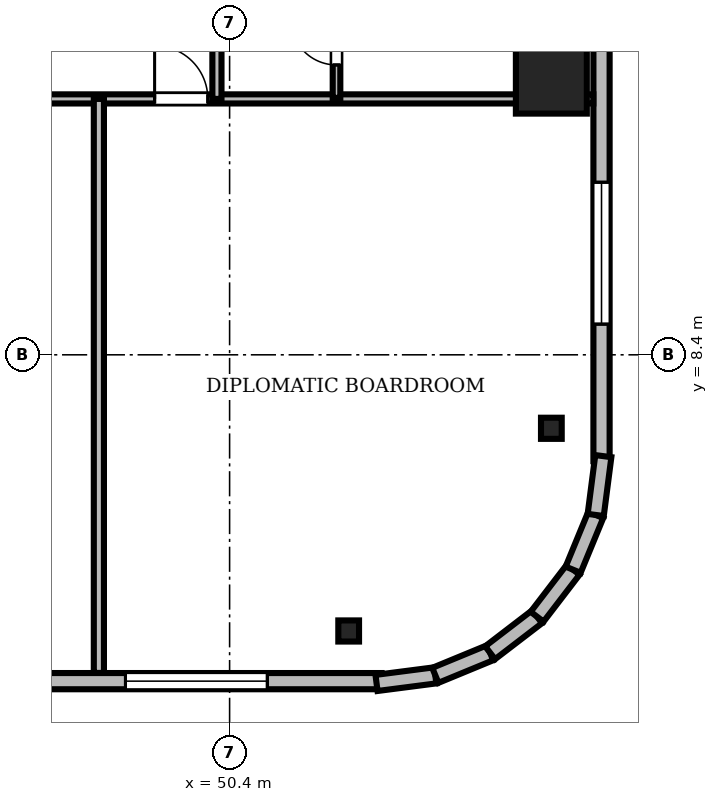
"""IFC4 building model, lengths in metres.
Left out: names, types, materials, properties, quantities, classifications, styles, units other than length and angle.
Written with IfcOpenShell. Run it as: python <this file> out.ifc"""

import sys

from ifc_helpers import new_model, si_unit, direction, frame, frame_2d, origin, origin_2d, place, context, subcontext, project, spatial, rectangle, i_section, extrude, source, transform, mapped, element, fill, save


model = new_model("IFC4")
c1 = context("Model", 3, precision=1e-05, world=origin(), true_north=direction((0.0, 1.0)))
c2 = subcontext(c1, "Body", "Model", "MODEL_VIEW")
j1 = project(units=[si_unit("LENGTHUNIT", "METRE"), si_unit("PLANEANGLEUNIT", "RADIAN")], contexts=[c1])
p1 = place(None, origin())
s1 = spatial("IfcSite", under=j1, at=p1, CompositionType="ELEMENT")
p2 = place(p1, origin())
s2 = spatial("IfcBuilding", under=s1, at=p2, CompositionType="ELEMENT")
p3 = place(p2, frame((0.0, 0.0, 203.55)))
s3 = spatial("IfcBuildingStorey", under=s2, at=p3, CompositionType="ELEMENT", Elevation=203.55)
m1 = source(origin(), c2, "Body", "SweptSolid", [
    extrude(rectangle(XDim=1.4, YDim=1.4, at=origin_2d()), origin(), (0.0, 0.0, 1.0), 3.53),
])
p4 = place(p3, frame((56.75, 13.86, 0.0), z_axis=(0.0, 0.0, 1.0), x_axis=(1.0, 0.0, 0.0)))
e1 = element("IfcColumn", 1, at=p4, inside=s3, PredefinedType="COLUMN", context=c2, shape_type="MappedRepresentation", body=[
    mapped(m1, transform((0.0, 0.0, 0.0), scale=1.0)),
])
m2 = source(origin(), c2, "Body", "SweptSolid", [
    extrude(i_section(OverallWidth=0.409, OverallDepth=0.417, WebThickness=0.021, FlangeThickness=0.033, FilletRadius=0.015, at=origin_2d()), origin(), (0.0, 0.0, 1.0), 3.53),
])
for number, where, z_axis, x_axis in (
    (2, (52.75, 2.95, 0.0), (0.0, 0.0, 1.0), (1.0, 0.0, 0.0)),
    (3, (56.75, 6.95, 0.0), (0.0, 0.0, 1.0), (1.0, 0.0, 0.0)),
):
    element("IfcColumn", number, at=place(p3, frame(where, z_axis=z_axis, x_axis=x_axis)), inside=s3, PredefinedType="COLUMN", context=c2, shape_type="MappedRepresentation", body=[
        mapped(m2, transform((0.0, 0.0, 0.0), scale=1.0)),
    ])
m3 = source(origin(), c2, "Body", "SweptSolid", [
    extrude(rectangle(XDim=15.6, YDim=0.32, at=frame_2d((7.8, 0.0))), origin(), (0.0, 0.0, 1.0), 3.53),
])
p5 = place(p3, frame((37.8, 1.96, 0.0), z_axis=(0.0, 0.0, 1.0), x_axis=(1.0, 0.0, 0.0)))
e4 = element("IfcWall", 4, at=p5, inside=s3, PredefinedType="SOLIDWALL", context=c2, shape_type="MappedRepresentation", body=[
    mapped(m3, transform((0.0, 0.0, 0.0), scale=1.0)),
])
m4 = source(origin(), c2, "Body", "SweptSolid", [
    extrude(rectangle(XDim=2.8, YDim=2.4, at=frame_2d((1.4, 1.2))), frame((0.0, 0.17, 0.0), z_axis=(0.0, -1.0, 0.0), x_axis=(1.0, 0.0, 0.0)), (0.0, 0.0, 1.0), 0.34),
])
p6 = place(p5, frame((10.545, 0.0, 0.72)))
e5 = element("IfcOpeningElement", 5, at=p6, cuts=e4, PredefinedType="OPENING", context=c2, shape_type="MappedRepresentation", body=[
    mapped(m4, transform((0.0, 0.0, 0.0), scale=1.0)),
])
p7 = place(p3, frame((57.74, 6.3, 0.0), z_axis=(0.0, 0.0, 1.0), x_axis=(0.0, 1.0, 0.0)))
e6 = element("IfcWall", 6, at=p7, inside=s3, PredefinedType="SOLIDWALL", context=c2, shape_type="MappedRepresentation", body=[
    mapped(m3, transform((0.0, 0.0, 0.0), scale=1.0)),
])
m5 = source(origin(), c2, "Body", "SweptSolid", [
    extrude(rectangle(XDim=1.4, YDim=2.3, at=frame_2d((0.7, 1.15))), frame((0.0, 0.17, 0.0), z_axis=(0.0, -1.0, 0.0), x_axis=(1.0, 0.0, 0.0)), (0.0, 0.0, 1.0), 0.34),
])
p8 = place(p7, frame((9.61, 0.0, 0.0)))
e7 = element("IfcOpeningElement", 7, at=p8, cuts=e6, PredefinedType="OPENING", context=c2, shape_type="MappedRepresentation", body=[
    mapped(m5, transform((0.0, 0.0, 0.0), scale=1.0)),
])
p9 = place(p7, frame((2.705, 0.0, 0.72)))
e8 = element("IfcOpeningElement", 8, at=p9, cuts=e6, PredefinedType="OPENING", context=c2, shape_type="MappedRepresentation", body=[
    mapped(m4, transform((0.0, 0.0, 0.0), scale=1.0)),
])
m6 = source(origin(), c2, "Body", "SweptSolid", [
    extrude(rectangle(XDim=1.17, YDim=0.32, at=frame_2d((0.585, 0.0))), origin(), (0.0, 0.0, 1.0), 3.53),
])
p10 = place(p3, frame((53.3, 1.925, 0.0), z_axis=(0.0, 0.0, 1.0), x_axis=(0.991762485493, 0.128090485085, 0.0)))
e9 = element("IfcWall", 9, at=p10, inside=s3, PredefinedType="SOLIDWALL", context=c2, shape_type="MappedRepresentation", body=[
    mapped(m6, transform((0.0, 0.0, 0.0), scale=1.0)),
])
m7 = source(origin(), c2, "Body", "SweptSolid", [
    extrude(rectangle(XDim=1.169, YDim=0.32, at=frame_2d((0.585, 0.0))), origin(), (0.0, 0.0, 1.0), 3.53),
])
p11 = place(p3, frame((54.46, 2.074, 0.0), z_axis=(0.0, 0.0, 1.0), x_axis=(0.924479075121, 0.381232789334, 0.0)))
e10 = element("IfcWall", 10, at=p11, inside=s3, PredefinedType="SOLIDWALL", context=c2, shape_type="MappedRepresentation", body=[
    mapped(m7, transform((0.0, 0.0, 0.0), scale=1.0)),
])
m8 = source(origin(), c2, "Body", "SweptSolid", [
    extrude(rectangle(XDim=1.169, YDim=0.32, at=frame_2d((0.584, 0.0))), origin(), (0.0, 0.0, 1.0), 3.53),
])
p12 = place(p3, frame((55.541, 2.52, 0.0), z_axis=(0.0, 0.0, 1.0), x_axis=(0.793663520347, 0.608356981114, 0.0)))
e11 = element("IfcWall", 11, at=p12, inside=s3, PredefinedType="SOLIDWALL", context=c2, shape_type="MappedRepresentation", body=[
    mapped(m8, transform((0.0, 0.0, 0.0), scale=1.0)),
])
m9 = source(origin(), c2, "Body", "SweptSolid", [
    extrude(rectangle(XDim=1.169, YDim=0.32, at=frame_2d((0.584, 0.0))), origin(), (0.0, 0.0, 1.0), 3.53),
])
for number, where, z_axis, x_axis in (
    (12, (56.469, 3.231, 0.0), (0.0, 0.0, 1.0), (0.608, 0.794, 0.0)),
    (13, (57.18, 4.159, 0.0), (0.0, 0.0, 1.0), (0.381, 0.925, 0.0)),
):
    element("IfcWall", number, at=place(p3, frame(where, z_axis=z_axis, x_axis=x_axis)), inside=s3, PredefinedType="SOLIDWALL", context=c2, shape_type="MappedRepresentation", body=[
        mapped(m9, transform((0.0, 0.0, 0.0), scale=1.0)),
    ])
m10 = source(origin(), c2, "Body", "SweptSolid", [
    extrude(rectangle(XDim=1.171, YDim=0.32, at=frame_2d((0.585, 0.0))), origin(), (0.0, 0.0, 1.0), 3.53),
])
p13 = place(p3, frame((57.625, 5.24, 0.0), z_axis=(0.0, 0.0, 1.0), x_axis=(0.128269133229, 0.991739395941, 0.0)))
e14 = element("IfcWall", 14, at=p13, inside=s3, PredefinedType="SOLIDWALL", context=c2, shape_type="MappedRepresentation", body=[
    mapped(m10, transform((0.0, 0.0, 0.0), scale=1.0)),
])
m11 = source(origin(), c2, "Body", "SweptSolid", [
    extrude(rectangle(XDim=46.156, YDim=0.18, at=frame_2d((23.078, 0.0))), origin(), (0.0, 0.0, 1.0), 2.772),
])
p14 = place(p3, frame((11.422, 13.45, 0.0), z_axis=(0.0, 0.0, 1.0), x_axis=(1.0, 0.0, 0.0)))
e15 = element("IfcWall", 15, at=p14, inside=s3, PredefinedType="PARTITIONING", context=c2, shape_type="MappedRepresentation", body=[
    mapped(m11, transform((0.0, 0.0, 0.0), scale=1.0)),
])
m12 = source(origin(), c2, "Body", "SweptSolid", [
    extrude(rectangle(XDim=1.05, YDim=2.2, at=frame_2d((0.525, 1.1))), frame((0.0, 0.1, 0.0), z_axis=(0.0, -1.0, 0.0), x_axis=(1.0, 0.0, 0.0)), (0.0, 0.0, 1.0), 0.2),
])
p15 = place(p14, frame((11.118, 0.0, 0.0)))
e16 = element("IfcOpeningElement", 16, at=p15, cuts=e15, PredefinedType="OPENING", context=c2, shape_type="MappedRepresentation", body=[
    mapped(m12, transform((0.0, 0.0, 0.0), scale=1.0)),
])
p16 = place(p14, frame((14.939, 0.0, 0.0)))
e17 = element("IfcOpeningElement", 17, at=p16, cuts=e15, PredefinedType="OPENING", context=c2, shape_type="MappedRepresentation", body=[
    mapped(m12, transform((0.0, 0.0, 0.0), scale=1.0)),
])
p17 = place(p14, frame((20.922, 0.0, 0.0)))
e18 = element("IfcOpeningElement", 18, at=p17, cuts=e15, PredefinedType="OPENING", context=c2, shape_type="MappedRepresentation", body=[
    mapped(m12, transform((0.0, 0.0, 0.0), scale=1.0)),
])
p18 = place(p14, frame((26.904, 0.0, 0.0)))
e19 = element("IfcOpeningElement", 19, at=p18, cuts=e15, PredefinedType="OPENING", context=c2, shape_type="MappedRepresentation", body=[
    mapped(m12, transform((0.0, 0.0, 0.0), scale=1.0)),
])
p19 = place(p14, frame((32.887, 0.0, 0.0)))
e20 = element("IfcOpeningElement", 20, at=p19, cuts=e15, PredefinedType="OPENING", context=c2, shape_type="MappedRepresentation", body=[
    mapped(m12, transform((0.0, 0.0, 0.0), scale=1.0)),
])
p20 = place(p14, frame((37.498, 0.0, 0.0)))
e21 = element("IfcOpeningElement", 21, at=p20, cuts=e15, PredefinedType="OPENING", context=c2, shape_type="MappedRepresentation", body=[
    mapped(m12, transform((0.0, 0.0, 0.0), scale=1.0)),
])
m13 = source(origin(), c2, "Body", "SweptSolid", [
    extrude(rectangle(XDim=27.65, YDim=0.18, at=frame_2d((13.825, 0.0))), origin(), (0.0, 0.0, 1.0), 2.972),
])
p21 = place(p3, frame((50.15, 13.45, 0.0), z_axis=(0.0, 0.0, 1.0), x_axis=(0.0, 1.0, 0.0)))
e22 = element("IfcWall", 22, at=p21, inside=s3, PredefinedType="PARTITIONING", context=c2, shape_type="MappedRepresentation", body=[
    mapped(m13, transform((0.0, 0.0, 0.0), scale=1.0)),
])
p22 = place(p21, frame((5.237, 0.0, 0.0)))
e23 = element("IfcOpeningElement", 23, at=p22, cuts=e22, PredefinedType="OPENING", context=c2, shape_type="MappedRepresentation", body=[
    mapped(m12, transform((0.0, 0.0, 0.0), scale=1.0)),
])
p23 = place(p21, frame((14.38, 0.0, 0.0)))
e24 = element("IfcOpeningElement", 24, at=p23, cuts=e22, PredefinedType="OPENING", context=c2, shape_type="MappedRepresentation", body=[
    mapped(m12, transform((0.0, 0.0, 0.0), scale=1.0)),
])
p24 = place(p21, frame((23.523, 0.0, 0.0)))
e25 = element("IfcOpeningElement", 25, at=p24, cuts=e22, PredefinedType="OPENING", context=c2, shape_type="MappedRepresentation", body=[
    mapped(m12, transform((0.0, 0.0, 0.0), scale=1.0)),
])
m14 = source(origin(), c2, "Body", "SweptSolid", [
    extrude(rectangle(XDim=2.29, YDim=0.15, at=frame_2d((1.145, 0.0))), origin(), (0.0, 0.0, 1.0), 2.972),
])
p25 = place(p3, frame((52.51, 13.47, 0.0), z_axis=(0.0, 0.0, 1.0), x_axis=(0.0, 1.0, 0.0)))
e26 = element("IfcWall", 26, at=p25, inside=s3, PredefinedType="PARTITIONING", context=c2, shape_type="MappedRepresentation", body=[
    mapped(m14, transform((0.0, 0.0, 0.0), scale=1.0)),
])
m15 = source(origin(), c2, "Body", "SweptSolid", [
    extrude(rectangle(XDim=0.9, YDim=2.1, at=frame_2d((0.45, 1.05))), frame((0.0, 0.085, 0.0), z_axis=(0.0, -1.0, 0.0), x_axis=(1.0, 0.0, 0.0)), (0.0, 0.0, 1.0), 0.17),
])
p26 = place(p25, frame((0.65, 0.0, 0.0)))
e27 = element("IfcOpeningElement", 27, at=p26, cuts=e26, PredefinedType="OPENING", context=c2, shape_type="MappedRepresentation", body=[
    mapped(m15, transform((0.0, 0.0, 0.0), scale=1.0)),
])
m16 = source(origin(), c2, "Body", "SweptSolid", [
    extrude(rectangle(XDim=11.328, YDim=0.2, at=frame_2d((5.664, 0.0))), origin(), (0.0, 0.0, 1.0), 2.772),
])
p27 = place(p3, frame((47.82, 2.122, 0.0), z_axis=(0.0, 0.0, 1.0), x_axis=(0.0, 1.0, 0.0)))
e28 = element("IfcWall", 28, at=p27, inside=s3, PredefinedType="PARTITIONING", context=c2, shape_type="MappedRepresentation", body=[
    mapped(m16, transform((0.0, 0.0, 0.0), scale=1.0)),
])
m17 = source(origin(), c2, "Body", "SweptSolid", [
    extrude(rectangle(XDim=2.8, YDim=2.4, at=frame_2d((1.4, 1.2))), frame((0.0, 0.03, 0.0), z_axis=(0.0, -1.0, 0.0), x_axis=(1.0, 0.0, 0.0)), (0.0, 0.0, 1.0), 0.06),
])
p28 = place(p6, origin())
e29 = element("IfcWindow", 29, at=p28, inside=s3, PartitioningType="SINGLE_PANEL", PredefinedType="WINDOW", context=c2, shape_type="MappedRepresentation", body=[
    mapped(m17, transform((0.0, 0.0, 0.0), scale=1.0)),
])
fill(e5, e29)
p29 = place(p9, origin())
e30 = element("IfcWindow", 30, at=p29, inside=s3, PartitioningType="SINGLE_PANEL", PredefinedType="WINDOW", context=c2, shape_type="MappedRepresentation", body=[
    mapped(m17, transform((0.0, 0.0, 0.0), scale=1.0)),
])
fill(e8, e30)
m18 = source(origin(), c2, "Body", "SweptSolid", [
    extrude(rectangle(XDim=1.05, YDim=2.2, at=frame_2d((0.525, 1.1))), frame((0.0, 0.025, 0.0), z_axis=(0.0, -1.0, 0.0), x_axis=(1.0, 0.0, 0.0)), (0.0, 0.0, 1.0), 0.05),
])
p30 = place(p20, origin())
e31 = element("IfcDoor", 31, at=p30, inside=s3, OperationType="SINGLE_SWING_LEFT", PredefinedType="DOOR", context=c2, shape_type="MappedRepresentation", body=[
    mapped(m18, transform((0.0, 0.0, 0.0), scale=1.0)),
])
fill(e21, e31)
m19 = source(origin(), c2, "Body", "SweptSolid", [
    extrude(rectangle(XDim=0.9, YDim=2.1, at=frame_2d((0.45, 1.05))), frame((0.0, 0.025, 0.0), z_axis=(0.0, -1.0, 0.0), x_axis=(1.0, 0.0, 0.0)), (0.0, 0.0, 1.0), 0.05),
])
p31 = place(p26, origin())
e32 = element("IfcDoor", 32, at=p31, inside=s3, OperationType="SINGLE_SWING_RIGHT", PredefinedType="DOOR", context=c2, shape_type="MappedRepresentation", body=[
    mapped(m19, transform((0.0, 0.0, 0.0), scale=1.0)),
])
fill(e27, e32)
save(model, sys.argv[1])
